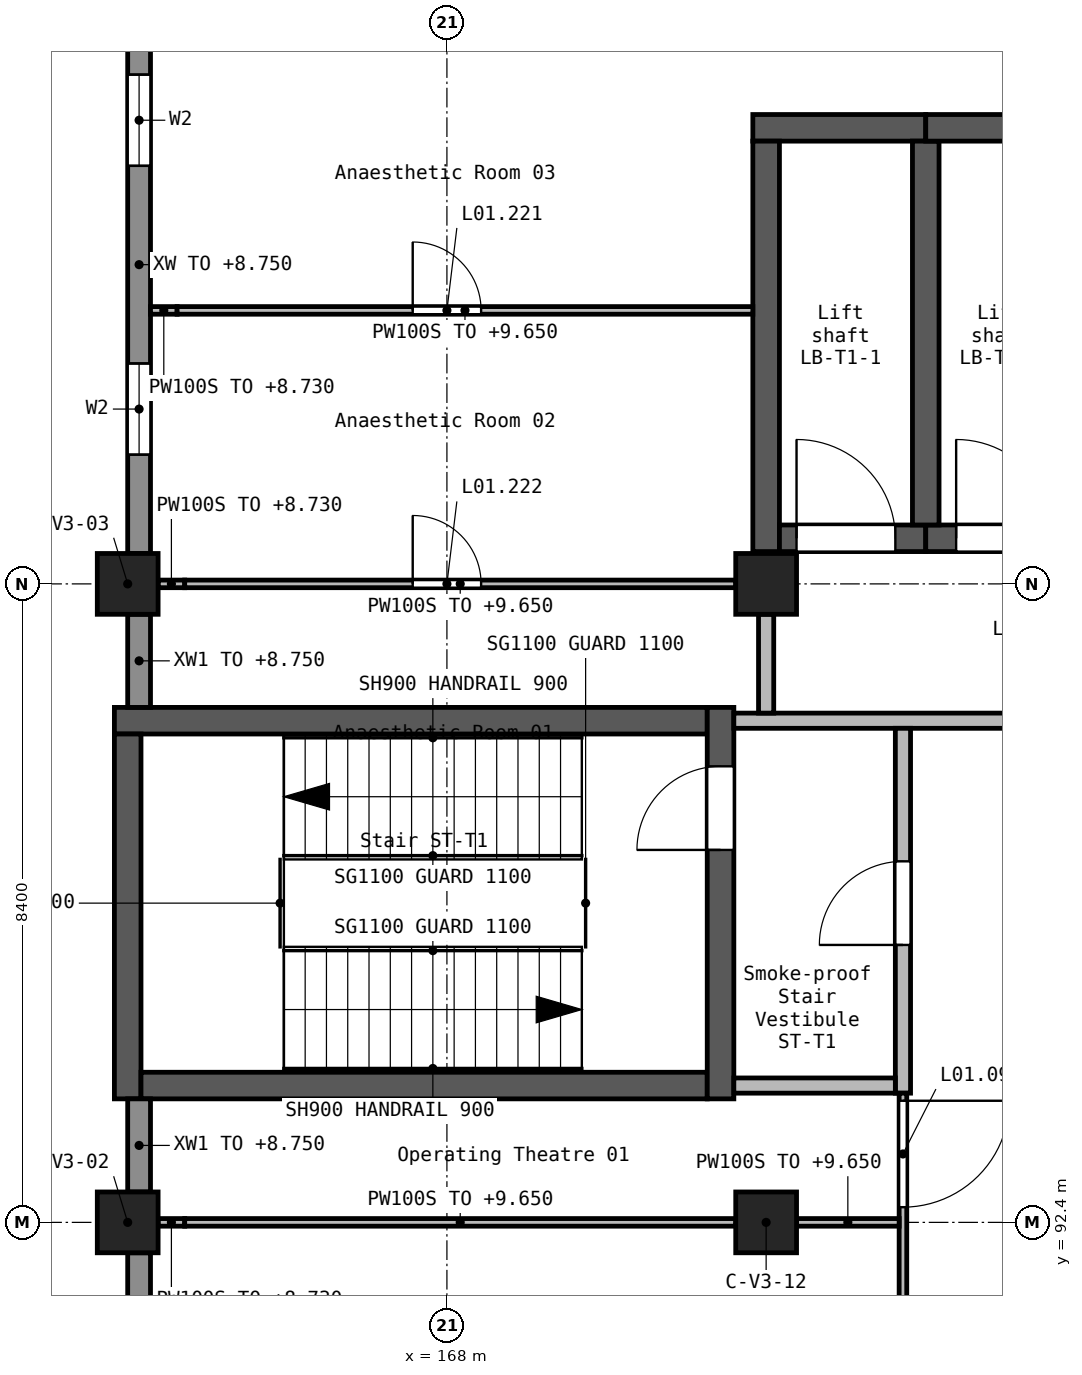
"""IFC4 building model, lengths in metres.
Left out: names, types, materials, properties, quantities, classifications, styles, units other than length and angle.
Written with IfcOpenShell. Run it as: python <this file> out.ifc"""

import sys

from ifc_helpers import new_model, si_unit, direction, frame, frame_2d, origin, origin_2d, place, context, subcontext, project, spatial, rectangle, extrude, element, fill, save


model = new_model("IFC4")
c1 = context("Model", 3, precision=1e-05, world=origin(), true_north=direction((0.0, 1.0)))
c2 = subcontext(c1, "Body", "Model", "MODEL_VIEW")
j1 = project(units=[si_unit("LENGTHUNIT", "METRE"), si_unit("PLANEANGLEUNIT", "RADIAN")], contexts=[c1])
p1 = place(None, origin())
s1 = spatial("IfcSite", under=j1, at=p1, CompositionType="ELEMENT")
p2 = place(p1, origin())
s2 = spatial("IfcBuilding", under=s1, at=p2, CompositionType="ELEMENT")
p3 = place(p2, frame((0.0, 0.0, 5.4)))
s3 = spatial("IfcBuildingStorey", under=s2, at=p3, CompositionType="ELEMENT", Elevation=5.4)
for number, where, z_axis, x_axis in (
    (1, (163.8, 92.4, 0.0), (0.0, 0.0, 1.0), (1.0, 0.0, 0.0)),
    (2, (163.8, 100.8, 0.0), (0.0, 0.0, 1.0), (1.0, 0.0, 0.0)),
    (3, (172.2, 92.4, 0.0), (0.0, 0.0, 1.0), (1.0, 0.0, 0.0)),
    (4, (172.2, 100.8, 0.0), (0.0, 0.0, 1.0), (1.0, 0.0, 0.0)),
):
    element("IfcColumn", number, at=place(p3, frame(where, z_axis=z_axis, x_axis=x_axis)), inside=s3, PredefinedType="COLUMN", context=c2, shape_type="SweptSolid", body=[
        extrude(rectangle(XDim=0.8, YDim=0.8, at=origin_2d()), origin(), (0.0, 0.0, 1.0), 4.5),
    ])
p4 = place(p3, frame((163.625, 99.0, 0.0), z_axis=(0.0, 0.0, 1.0), x_axis=(1.0, 0.0, 0.0)))
e5 = element("IfcWall", 5, at=p4, inside=s3, PredefinedType="SHEAR", context=c2, shape_type="SweptSolid", body=[
    extrude(rectangle(XDim=7.8, YDim=0.35, at=frame_2d((3.9, 0.0))), origin(), (0.0, 0.0, 1.0), 4.5),
])
p5 = place(p3, frame((163.8, 94.025, 0.0), z_axis=(0.0, 0.0, 1.0), x_axis=(0.0, 1.0, 0.0)))
e6 = element("IfcWall", 6, at=p5, inside=s3, PredefinedType="SHEAR", context=c2, shape_type="SweptSolid", body=[
    extrude(rectangle(XDim=4.8, YDim=0.35, at=frame_2d((2.4, 0.0))), origin(), (0.0, 0.0, 1.0), 4.5),
])
p6 = place(p3, frame((163.975, 94.2, 0.0), z_axis=(0.0, 0.0, 1.0), x_axis=(1.0, 0.0, 0.0)))
e7 = element("IfcWall", 7, at=p6, inside=s3, PredefinedType="SHEAR", context=c2, shape_type="SweptSolid", body=[
    extrude(rectangle(XDim=7.45, YDim=0.35, at=frame_2d((3.725, 0.0))), origin(), (0.0, 0.0, 1.0), 4.5),
])
p7 = place(p3, frame((171.6, 94.025, 0.0), z_axis=(0.0, 0.0, 1.0), x_axis=(0.0, 1.0, 0.0)))
e8 = element("IfcWall", 8, at=p7, inside=s3, PredefinedType="SHEAR", context=c2, shape_type="SweptSolid", body=[
    extrude(rectangle(XDim=5.15, YDim=0.35, at=frame_2d((2.575, 0.0))), origin(), (0.0, 0.0, 1.0), 4.5),
])
p8 = place(p7, frame((3.275, 0.0, 0.0)))
e9 = element("IfcOpeningElement", 9, at=p8, cuts=e8, PredefinedType="OPENING", context=c2, shape_type="SweptSolid", body=[
    extrude(rectangle(XDim=1.1, YDim=2.1, at=frame_2d((0.55, 1.05))), frame((0.0, 0.185, 0.0), z_axis=(0.0, -1.0, 0.0), x_axis=(1.0, 0.0, 0.0)), (0.0, 0.0, 1.0), 0.37),
])
p9 = place(p3, frame((172.025, 106.8, 0.0), z_axis=(0.0, 0.0, 1.0), x_axis=(1.0, 0.0, 0.0)))
e10 = element("IfcWall", 10, at=p9, inside=s3, PredefinedType="SHEAR", context=c2, shape_type="SweptSolid", body=[
    extrude(rectangle(XDim=2.275, YDim=0.35, at=frame_2d((1.138, 0.0))), origin(), (0.0, 0.0, 1.0), 4.5),
])
p10 = place(p3, frame((172.2, 101.225, 0.0), z_axis=(0.0, 0.0, 1.0), x_axis=(0.0, 1.0, 0.0)))
e11 = element("IfcWall", 11, at=p10, inside=s3, PredefinedType="SHEAR", context=c2, shape_type="SweptSolid", body=[
    extrude(rectangle(XDim=5.4, YDim=0.35, at=frame_2d((2.7, 0.0))), origin(), (0.0, 0.0, 1.0), 4.5),
])
p11 = place(p3, frame((172.375, 101.4, 0.0), z_axis=(0.0, 0.0, 1.0), x_axis=(1.0, 0.0, 0.0)))
e12 = element("IfcWall", 12, at=p11, inside=s3, PredefinedType="SHEAR", context=c2, shape_type="SweptSolid", body=[
    extrude(rectangle(XDim=1.925, YDim=0.35, at=frame_2d((0.962, 0.0))), origin(), (0.0, 0.0, 1.0), 4.5),
])
p12 = place(p11, frame((0.225, 0.0, 0.0)))
e13 = element("IfcOpeningElement", 13, at=p12, cuts=e12, PredefinedType="OPENING", context=c2, shape_type="SweptSolid", body=[
    extrude(rectangle(XDim=1.3, YDim=2.1, at=frame_2d((0.65, 1.05))), frame((0.0, 0.185, 0.0), z_axis=(0.0, -1.0, 0.0), x_axis=(1.0, 0.0, 0.0)), (0.0, 0.0, 1.0), 0.37),
])
p13 = place(p3, frame((174.3, 101.4, 0.0), z_axis=(0.0, 0.0, 1.0), x_axis=(1.0, 0.0, 0.0)))
e14 = element("IfcWall", 14, at=p13, inside=s3, PredefinedType="SHEAR", context=c2, shape_type="SweptSolid", body=[
    extrude(rectangle(XDim=2.1, YDim=0.35, at=frame_2d((1.05, 0.0))), origin(), (0.0, 0.0, 1.0), 4.5),
])
p14 = place(p13, frame((0.4, 0.0, 0.0)))
e15 = element("IfcOpeningElement", 15, at=p14, cuts=e14, PredefinedType="OPENING", context=c2, shape_type="SweptSolid", body=[
    extrude(rectangle(XDim=1.3, YDim=2.1, at=frame_2d((0.65, 1.05))), frame((0.0, 0.185, 0.0), z_axis=(0.0, -1.0, 0.0), x_axis=(1.0, 0.0, 0.0)), (0.0, 0.0, 1.0), 0.37),
])
p15 = place(p3, frame((174.3, 101.575, 0.0), z_axis=(0.0, 0.0, 1.0), x_axis=(0.0, 1.0, 0.0)))
e16 = element("IfcWall", 16, at=p15, inside=s3, PredefinedType="SHEAR", context=c2, shape_type="SweptSolid", body=[
    extrude(rectangle(XDim=5.05, YDim=0.35, at=frame_2d((2.525, 0.0))), origin(), (0.0, 0.0, 1.0), 4.5),
])
p16 = place(p3, frame((174.3, 106.8, 0.0), z_axis=(0.0, 0.0, 1.0), x_axis=(1.0, 0.0, 0.0)))
e17 = element("IfcWall", 17, at=p16, inside=s3, PredefinedType="SHEAR", context=c2, shape_type="SweptSolid", body=[
    extrude(rectangle(XDim=2.1, YDim=0.35, at=frame_2d((1.05, 0.0))), origin(), (0.0, 0.0, 1.0), 4.5),
])
p17 = place(p3, frame((163.95, 108.8, 0.0), z_axis=(0.0, 0.0, 1.0), x_axis=(0.0, -1.0, 0.0)))
e18 = element("IfcWall", 18, at=p17, inside=s3, PredefinedType="STANDARD", context=c2, shape_type="SweptSolid", body=[
    extrude(rectangle(XDim=7.6, YDim=0.3, at=frame_2d((3.8, 0.0))), origin(), (0.0, 0.0, 1.0), 3.35),
])
p18 = place(p17, frame((1.3, 0.0, 1.2)))
e19 = element("IfcOpeningElement", 19, at=p18, cuts=e18, PredefinedType="OPENING", context=c2, shape_type="SweptSolid", body=[
    extrude(rectangle(XDim=1.2, YDim=1.2, at=frame_2d((0.6, 0.6))), frame((0.0, 0.16, 0.0), z_axis=(0.0, -1.0, 0.0), x_axis=(1.0, 0.0, 0.0)), (0.0, 0.0, 1.0), 0.32),
])
p19 = place(p17, frame((5.1, 0.0, 1.2)))
e20 = element("IfcOpeningElement", 20, at=p19, cuts=e18, PredefinedType="OPENING", context=c2, shape_type="SweptSolid", body=[
    extrude(rectangle(XDim=1.2, YDim=1.2, at=frame_2d((0.6, 0.6))), frame((0.0, 0.16, 0.0), z_axis=(0.0, -1.0, 0.0), x_axis=(1.0, 0.0, 0.0)), (0.0, 0.0, 1.0), 0.32),
])
for number, where, z_axis, x_axis in (
    (21, (163.95, 100.4, 0.0), (0.0, 0.0, 1.0), (0.0, -1.0, 0.0)),
    (22, (163.95, 94.025, 0.0), (0.0, 0.0, 1.0), (0.0, -1.0, 0.0)),
):
    element("IfcWall", number, at=place(p3, frame(where, z_axis=z_axis, x_axis=x_axis)), inside=s3, PredefinedType="STANDARD", context=c2, shape_type="SweptSolid", body=[
        extrude(rectangle(XDim=1.225, YDim=0.3, at=frame_2d((0.612, 0.0))), origin(), (0.0, 0.0, 1.0), 3.35),
    ])
p20 = place(p3, frame((163.95, 92.0, 0.0), z_axis=(0.0, 0.0, 1.0), x_axis=(0.0, -1.0, 0.0)))
e23 = element("IfcWall", 23, at=p20, inside=s3, PredefinedType="STANDARD", context=c2, shape_type="SweptSolid", body=[
    extrude(rectangle(XDim=7.6, YDim=0.3, at=frame_2d((3.8, 0.0))), origin(), (0.0, 0.0, 1.0), 3.35),
])
p21 = place(p20, frame((1.3, 0.0, 1.2)))
e24 = element("IfcOpeningElement", 24, at=p21, cuts=e23, PredefinedType="OPENING", context=c2, shape_type="SweptSolid", body=[
    extrude(rectangle(XDim=1.2, YDim=1.2, at=frame_2d((0.6, 0.6))), frame((0.0, 0.16, 0.0), z_axis=(0.0, -1.0, 0.0), x_axis=(1.0, 0.0, 0.0)), (0.0, 0.0, 1.0), 0.32),
])
p22 = place(p20, frame((5.1, 0.0, 1.2)))
e25 = element("IfcOpeningElement", 25, at=p22, cuts=e23, PredefinedType="OPENING", context=c2, shape_type="SweptSolid", body=[
    extrude(rectangle(XDim=1.2, YDim=1.2, at=frame_2d((0.6, 0.6))), frame((0.0, 0.16, 0.0), z_axis=(0.0, -1.0, 0.0), x_axis=(1.0, 0.0, 0.0)), (0.0, 0.0, 1.0), 0.32),
])
p23 = place(p3, frame((180.7, 99.0, 0.0), z_axis=(0.0, 0.0, 1.0), x_axis=(-1.0, 0.0, 0.0)))
e26 = element("IfcWall", 26, at=p23, inside=s3, PredefinedType="SOLIDWALL", context=c2, shape_type="SweptSolid", body=[
    extrude(rectangle(XDim=8.925, YDim=0.2, at=frame_2d((4.462, 0.0))), origin(), (0.0, 0.0, 1.0), 4.25),
])
p24 = place(p23, frame((2.5, 0.0, 0.0)))
e27 = element("IfcOpeningElement", 27, at=p24, cuts=e26, PredefinedType="OPENING", context=c2, shape_type="SweptSolid", body=[
    extrude(rectangle(XDim=1.8, YDim=2.1, at=frame_2d((0.9, 1.05))), frame((0.0, 0.11, 0.0), z_axis=(0.0, -1.0, 0.0), x_axis=(1.0, 0.0, 0.0)), (0.0, 0.0, 1.0), 0.22),
])
p25 = place(p3, frame((174.0, 94.1, 0.0), z_axis=(0.0, 0.0, 1.0), x_axis=(0.0, 1.0, 0.0)))
e28 = element("IfcWall", 28, at=p25, inside=s3, PredefinedType="SOLIDWALL", context=c2, shape_type="SweptSolid", body=[
    extrude(rectangle(XDim=4.8, YDim=0.2, at=frame_2d((2.4, 0.0))), origin(), (0.0, 0.0, 1.0), 4.25),
])
p26 = place(p25, frame((1.95, 0.0, 0.0)))
e29 = element("IfcOpeningElement", 29, at=p26, cuts=e28, PredefinedType="OPENING", context=c2, shape_type="SweptSolid", body=[
    extrude(rectangle(XDim=1.1, YDim=2.1, at=frame_2d((0.55, 1.05))), frame((0.0, 0.11, 0.0), z_axis=(0.0, -1.0, 0.0), x_axis=(1.0, 0.0, 0.0)), (0.0, 0.0, 1.0), 0.22),
])
p27 = place(p3, frame((171.775, 94.2, 0.0), z_axis=(0.0, 0.0, 1.0), x_axis=(1.0, 0.0, 0.0)))
e30 = element("IfcWall", 30, at=p27, inside=s3, PredefinedType="SOLIDWALL", context=c2, shape_type="SweptSolid", body=[
    extrude(rectangle(XDim=2.125, YDim=0.2, at=frame_2d((1.062, 0.0))), origin(), (0.0, 0.0, 1.0), 4.25),
])
p28 = place(p3, frame((172.2, 99.1, 0.0), z_axis=(0.0, 0.0, 1.0), x_axis=(0.0, 1.0, 0.0)))
e31 = element("IfcWall", 31, at=p28, inside=s3, PredefinedType="SOLIDWALL", context=c2, shape_type="SweptSolid", body=[
    extrude(rectangle(XDim=1.3, YDim=0.2, at=frame_2d((0.65, 0.0))), origin(), (0.0, 0.0, 1.0), 4.25),
])
p29 = place(p3, frame((174.0, 94.1, 0.0), z_axis=(0.0, 0.0, 1.0), x_axis=(0.0, -1.0, 0.0)))
e32 = element("IfcWall", 32, at=p29, inside=s3, PredefinedType="PARTITIONING", context=c2, shape_type="SweptSolid", body=[
    extrude(rectangle(XDim=17.85, YDim=0.1, at=frame_2d((8.925, 0.0))), origin(), (0.0, 0.0, 1.0), 4.25),
])
p30 = place(p29, frame((0.1, 0.0, 0.0)))
e33 = element("IfcOpeningElement", 33, at=p30, cuts=e32, PredefinedType="OPENING", context=c2, shape_type="SweptSolid", body=[
    extrude(rectangle(XDim=1.4, YDim=2.1, at=frame_2d((0.7, 1.05))), frame((0.0, 0.06, 0.0), z_axis=(0.0, -1.0, 0.0), x_axis=(1.0, 0.0, 0.0)), (0.0, 0.0, 1.0), 0.12),
])
p31 = place(p29, frame((3.4, 0.0, 0.0)))
e34 = element("IfcOpeningElement", 34, at=p31, cuts=e32, PredefinedType="OPENING", context=c2, shape_type="SweptSolid", body=[
    extrude(rectangle(XDim=1.4, YDim=2.1, at=frame_2d((0.7, 1.05))), frame((0.0, 0.06, 0.0), z_axis=(0.0, -1.0, 0.0), x_axis=(1.0, 0.0, 0.0)), (0.0, 0.0, 1.0), 0.12),
])
p32 = place(p29, frame((7.6, 0.0, 0.0)))
e35 = element("IfcOpeningElement", 35, at=p32, cuts=e32, PredefinedType="OPENING", context=c2, shape_type="SweptSolid", body=[
    extrude(rectangle(XDim=1.4, YDim=2.1, at=frame_2d((0.7, 1.05))), frame((0.0, 0.06, 0.0), z_axis=(0.0, -1.0, 0.0), x_axis=(1.0, 0.0, 0.0)), (0.0, 0.0, 1.0), 0.12),
])
p33 = place(p29, frame((11.3, 0.0, 0.0)))
e36 = element("IfcOpeningElement", 36, at=p33, cuts=e32, PredefinedType="OPENING", context=c2, shape_type="SweptSolid", body=[
    extrude(rectangle(XDim=1.8, YDim=2.1, at=frame_2d((0.9, 1.05))), frame((0.0, 0.06, 0.0), z_axis=(0.0, -1.0, 0.0), x_axis=(1.0, 0.0, 0.0)), (0.0, 0.0, 1.0), 0.12),
])
p34 = place(p29, frame((15.7, 0.0, 0.0)))
e37 = element("IfcOpeningElement", 37, at=p34, cuts=e32, PredefinedType="OPENING", context=c2, shape_type="SweptSolid", body=[
    extrude(rectangle(XDim=1.4, YDim=2.1, at=frame_2d((0.7, 1.05))), frame((0.0, 0.06, 0.0), z_axis=(0.0, -1.0, 0.0), x_axis=(1.0, 0.0, 0.0)), (0.0, 0.0, 1.0), 0.12),
])
p35 = place(p3, frame((164.2, 92.4, 0.0), z_axis=(0.0, 0.0, 1.0), x_axis=(1.0, 0.0, 0.0)))
e38 = element("IfcWall", 38, at=p35, inside=s3, PredefinedType="PARTITIONING", context=c2, shape_type="SweptSolid", body=[
    extrude(rectangle(XDim=0.35, YDim=0.1, at=frame_2d((0.175, 0.0))), origin(), (0.0, 0.0, 1.0), 3.33),
])
p36 = place(p3, frame((164.55, 92.4, 0.0), z_axis=(0.0, 0.0, 1.0), x_axis=(1.0, 0.0, 0.0)))
e39 = element("IfcWall", 39, at=p36, inside=s3, PredefinedType="PARTITIONING", context=c2, shape_type="SweptSolid", body=[
    extrude(rectangle(XDim=7.25, YDim=0.1, at=frame_2d((3.625, 0.0))), origin(), (0.0, 0.0, 1.0), 4.25),
])
p37 = place(p3, frame((172.6, 92.4, 0.0), z_axis=(0.0, 0.0, 1.0), x_axis=(1.0, 0.0, 0.0)))
e40 = element("IfcWall", 40, at=p37, inside=s3, PredefinedType="PARTITIONING", context=c2, shape_type="SweptSolid", body=[
    extrude(rectangle(XDim=1.35, YDim=0.1, at=frame_2d((0.675, 0.0))), origin(), (0.0, 0.0, 1.0), 4.25),
])
p38 = place(p3, frame((164.2, 100.8, 0.0), z_axis=(0.0, 0.0, 1.0), x_axis=(1.0, 0.0, 0.0)))
e41 = element("IfcWall", 41, at=p38, inside=s3, PredefinedType="PARTITIONING", context=c2, shape_type="SweptSolid", body=[
    extrude(rectangle(XDim=0.35, YDim=0.1, at=frame_2d((0.175, 0.0))), origin(), (0.0, 0.0, 1.0), 3.33),
])
p39 = place(p3, frame((164.55, 100.8, 0.0), z_axis=(0.0, 0.0, 1.0), x_axis=(1.0, 0.0, 0.0)))
e42 = element("IfcWall", 42, at=p39, inside=s3, PredefinedType="PARTITIONING", context=c2, shape_type="SweptSolid", body=[
    extrude(rectangle(XDim=7.25, YDim=0.1, at=frame_2d((3.625, 0.0))), origin(), (0.0, 0.0, 1.0), 4.25),
])
p40 = place(p39, frame((3.0, 0.0, 0.0)))
e43 = element("IfcOpeningElement", 43, at=p40, cuts=e42, PredefinedType="OPENING", context=c2, shape_type="SweptSolid", body=[
    extrude(rectangle(XDim=0.9, YDim=2.1, at=frame_2d((0.45, 1.05))), frame((0.0, 0.06, 0.0), z_axis=(0.0, -1.0, 0.0), x_axis=(1.0, 0.0, 0.0)), (0.0, 0.0, 1.0), 0.12),
])
p41 = place(p3, frame((164.1, 104.398, 0.0), z_axis=(0.0, 0.0, 1.0), x_axis=(1.0, 0.0, 0.0)))
e44 = element("IfcWall", 44, at=p41, inside=s3, PredefinedType="PARTITIONING", context=c2, shape_type="SweptSolid", body=[
    extrude(rectangle(XDim=0.35, YDim=0.1, at=frame_2d((0.175, 0.0))), origin(), (0.0, 0.0, 1.0), 3.33),
])
p42 = place(p3, frame((164.45, 104.398, 0.0), z_axis=(0.0, 0.0, 1.0), x_axis=(1.0, 0.0, 0.0)))
e45 = element("IfcWall", 45, at=p42, inside=s3, PredefinedType="PARTITIONING", context=c2, shape_type="SweptSolid", body=[
    extrude(rectangle(XDim=7.575, YDim=0.1, at=frame_2d((3.788, 0.0))), origin(), (0.0, 0.0, 1.0), 4.25),
])
p43 = place(p42, frame((3.1, 0.0, 0.0)))
e46 = element("IfcOpeningElement", 46, at=p43, cuts=e45, PredefinedType="OPENING", context=c2, shape_type="SweptSolid", body=[
    extrude(rectangle(XDim=0.9, YDim=2.1, at=frame_2d((0.45, 1.05))), frame((0.0, 0.06, 0.0), z_axis=(0.0, -1.0, 0.0), x_axis=(1.0, 0.0, 0.0)), (0.0, 0.0, 1.0), 0.12),
])
p44 = place(p18, origin())
e47 = element("IfcWindow", 47, at=p44, inside=s3, PartitioningType="SINGLE_PANEL", PredefinedType="WINDOW", context=c2, shape_type="SweptSolid", body=[
    extrude(rectangle(XDim=1.2, YDim=1.2, at=frame_2d((0.6, 0.6))), frame((0.0, 0.03, 0.0), z_axis=(0.0, -1.0, 0.0), x_axis=(1.0, 0.0, 0.0)), (0.0, 0.0, 1.0), 0.06),
])
fill(e19, e47)
p45 = place(p19, origin())
e48 = element("IfcWindow", 48, at=p45, inside=s3, PartitioningType="SINGLE_PANEL", PredefinedType="WINDOW", context=c2, shape_type="SweptSolid", body=[
    extrude(rectangle(XDim=1.2, YDim=1.2, at=frame_2d((0.6, 0.6))), frame((0.0, 0.03, 0.0), z_axis=(0.0, -1.0, 0.0), x_axis=(1.0, 0.0, 0.0)), (0.0, 0.0, 1.0), 0.06),
])
fill(e20, e48)
p46 = place(p12, origin())
e49 = element("IfcDoor", 49, at=p46, inside=s3, OperationType="DOUBLE_DOOR_SLIDING", PredefinedType="DOOR", context=c2, shape_type="SweptSolid", body=[
    extrude(rectangle(XDim=1.3, YDim=2.1, at=frame_2d((0.65, 1.05))), frame((0.0, 0.025, 0.0), z_axis=(0.0, -1.0, 0.0), x_axis=(1.0, 0.0, 0.0)), (0.0, 0.0, 1.0), 0.05),
])
fill(e13, e49)
p47 = place(p14, origin())
e50 = element("IfcDoor", 50, at=p47, inside=s3, OperationType="DOUBLE_DOOR_SLIDING", PredefinedType="DOOR", context=c2, shape_type="SweptSolid", body=[
    extrude(rectangle(XDim=1.3, YDim=2.1, at=frame_2d((0.65, 1.05))), frame((0.0, 0.025, 0.0), z_axis=(0.0, -1.0, 0.0), x_axis=(1.0, 0.0, 0.0)), (0.0, 0.0, 1.0), 0.05),
])
fill(e15, e50)
p48 = place(p8, origin())
e51 = element("IfcDoor", 51, at=p48, inside=s3, OperationType="SINGLE_SWING_RIGHT", PredefinedType="DOOR", context=c2, shape_type="SweptSolid", body=[
    extrude(rectangle(XDim=1.1, YDim=2.1, at=frame_2d((0.55, 1.05))), frame((0.0, 0.025, 0.0), z_axis=(0.0, -1.0, 0.0), x_axis=(1.0, 0.0, 0.0)), (0.0, 0.0, 1.0), 0.05),
])
fill(e9, e51)
p49 = place(p26, origin())
e52 = element("IfcDoor", 52, at=p49, inside=s3, OperationType="SINGLE_SWING_RIGHT", PredefinedType="DOOR", context=c2, shape_type="SweptSolid", body=[
    extrude(rectangle(XDim=1.1, YDim=2.1, at=frame_2d((0.55, 1.05))), frame((0.0, 0.025, 0.0), z_axis=(0.0, -1.0, 0.0), x_axis=(1.0, 0.0, 0.0)), (0.0, 0.0, 1.0), 0.05),
])
fill(e29, e52)
p50 = place(p30, frame((1.4, 0.0, 0.0), z_axis=(0.0, 0.0, 1.0), x_axis=(-1.0, 0.0, 0.0)))
e53 = element("IfcDoor", 53, at=p50, inside=s3, OperationType="DOUBLE_DOOR_SINGLE_SWING", PredefinedType="DOOR", context=c2, shape_type="SweptSolid", body=[
    extrude(rectangle(XDim=1.4, YDim=2.1, at=frame_2d((0.7, 1.05))), frame((0.0, 0.025, 0.0), z_axis=(0.0, -1.0, 0.0), x_axis=(1.0, 0.0, 0.0)), (0.0, 0.0, 1.0), 0.05),
])
fill(e33, e53)
p51 = place(p43, frame((0.9, 0.0, 0.0), z_axis=(0.0, 0.0, 1.0), x_axis=(-1.0, 0.0, 0.0)))
e54 = element("IfcDoor", 54, at=p51, inside=s3, OperationType="SINGLE_SWING_RIGHT", PredefinedType="DOOR", context=c2, shape_type="SweptSolid", body=[
    extrude(rectangle(XDim=0.9, YDim=2.1, at=frame_2d((0.45, 1.05))), frame((0.0, 0.025, 0.0), z_axis=(0.0, -1.0, 0.0), x_axis=(1.0, 0.0, 0.0)), (0.0, 0.0, 1.0), 0.05),
])
fill(e46, e54)
p52 = place(p40, frame((0.9, 0.0, 0.0), z_axis=(0.0, 0.0, 1.0), x_axis=(-1.0, 0.0, 0.0)))
e55 = element("IfcDoor", 55, at=p52, inside=s3, OperationType="SINGLE_SWING_RIGHT", PredefinedType="DOOR", context=c2, shape_type="SweptSolid", body=[
    extrude(rectangle(XDim=0.9, YDim=2.1, at=frame_2d((0.45, 1.05))), frame((0.0, 0.025, 0.0), z_axis=(0.0, -1.0, 0.0), x_axis=(1.0, 0.0, 0.0)), (0.0, 0.0, 1.0), 0.05),
])
fill(e43, e55)
save(model, sys.argv[1])
